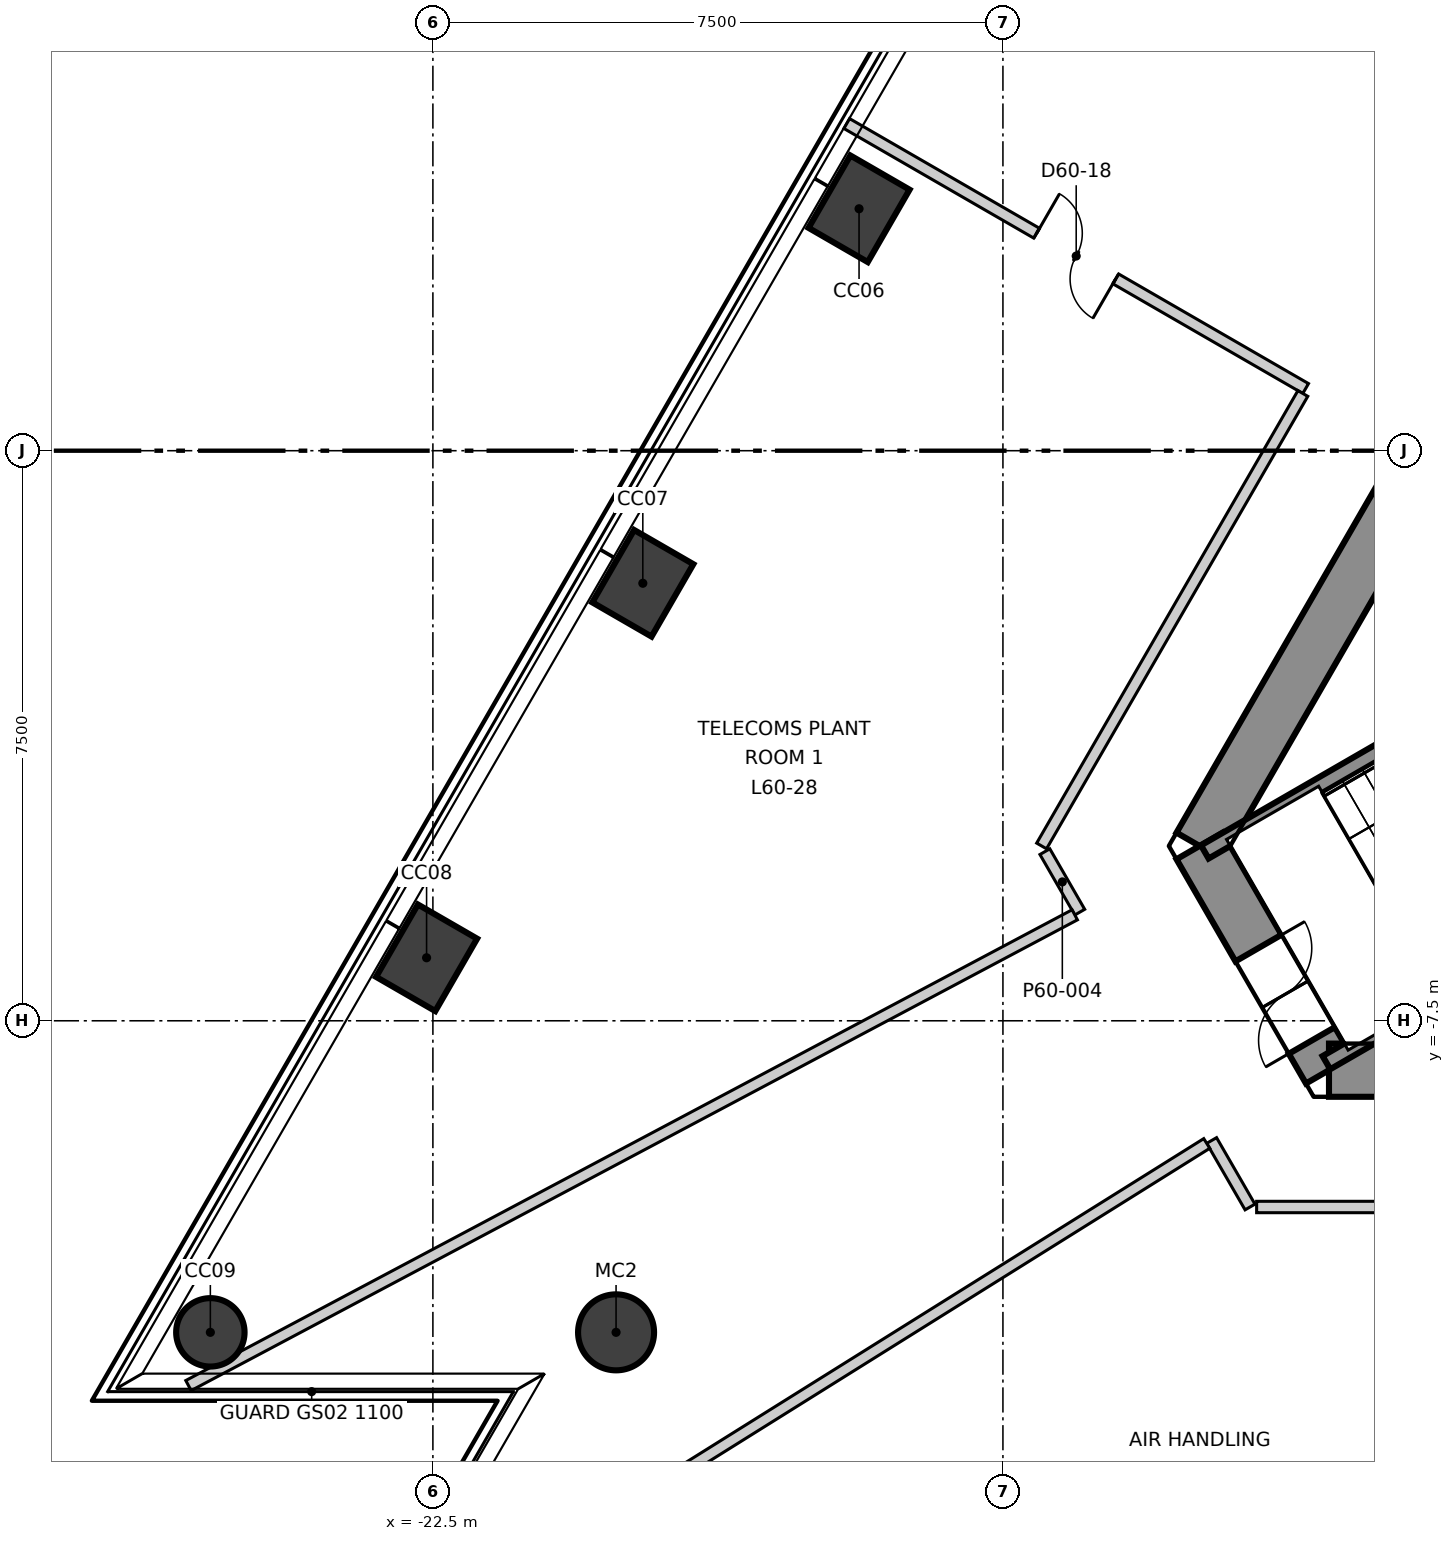
"""IFC4 building model, lengths in metres.
Left out: names, types, materials, properties, quantities, classifications, styles, units other than length and angle.
Written with IfcOpenShell. Run it as: python <this file> out.ifc"""

import sys

from ifc_helpers import new_model, si_unit, direction, frame, frame_2d, origin, origin_2d, place, context, subcontext, project, spatial, polyline, rectangle, circle, outline, extrude, element, fill, save


model = new_model("IFC4")
c1 = context("Model", 3, precision=1e-05, world=origin(), true_north=direction((0.0, 1.0)))
c2 = subcontext(c1, "Body", "Model", "MODEL_VIEW")
j1 = project(units=[si_unit("LENGTHUNIT", "METRE"), si_unit("PLANEANGLEUNIT", "RADIAN")], contexts=[c1])
p1 = place(None, origin())
s1 = spatial("IfcSite", under=j1, at=p1, CompositionType="ELEMENT")
p2 = place(p1, origin())
s2 = spatial("IfcBuilding", under=s1, at=p2, CompositionType="ELEMENT")
p3 = place(p2, frame((0.0, 0.0, 255.8)))
s3 = spatial("IfcBuildingStorey", under=s2, at=p3, CompositionType="ELEMENT", Elevation=255.8)
p4 = place(p3, frame((-1.703, 13.35, -0.6), z_axis=(0.0, 0.0, 1.0), x_axis=(-0.500011533395, -0.866018744874, 0.0)))
e1 = element("IfcWall", 1, at=p4, inside=s3, PredefinedType="SHEAR", context=c2, shape_type="SweptSolid", body=[
    extrude(outline(polyline([(-0.202, -0.35), (1.782, -0.35), (3.766, -0.35), (5.75, -0.35), (7.734, -0.35), (9.718, -0.35), (11.702, -0.35), (13.686, -0.35), (15.67, -0.35), (17.654, -0.35), (19.638, -0.35), (21.622, -0.35), (21.218, 0.35), (19.307, 0.35), (17.397, 0.35), (15.486, 0.35), (13.576, 0.35), (11.665, 0.35), (9.755, 0.35), (7.844, 0.35), (5.934, 0.35), (4.023, 0.35), (2.113, 0.35), (0.202, 0.35), (-0.202, -0.35)])), origin(), (0.0, 0.0, 1.0), 6.3),
])
p5 = place(p4, frame((10.16, 0.0, 0.6)))
e2 = element("IfcOpeningElement", 2, at=p5, cuts=e1, PredefinedType="OPENING", context=c2, shape_type="SweptSolid", body=[
    extrude(rectangle(XDim=1.1, YDim=2.1, at=frame_2d((0.55, 1.05))), frame((0.0, 0.36, 0.0), z_axis=(0.0, -1.0, 0.0), x_axis=(1.0, 0.0, 0.0)), (0.0, 0.0, 1.0), 0.72),
])
p6 = place(p3, frame((-12.413, -5.2, -0.6), z_axis=(0.0, 0.0, 1.0), x_axis=(0.49999337185, -0.866029230515, 0.0)))
e3 = element("IfcWall", 3, at=p6, inside=s3, PredefinedType="SHEAR", context=c2, shape_type="SweptSolid", body=[
    extrude(outline(polyline([(-0.202, -0.35), (1.703, -0.35), (3.608, -0.35), (3.204, 0.35), (1.703, 0.35), (0.202, 0.35), (-0.202, -0.35)])), origin(), (0.0, 0.0, 1.0), 6.3),
])
p7 = place(p6, frame((1.553, 0.0, 0.6)))
e4 = element("IfcOpeningElement", 4, at=p7, cuts=e3, PredefinedType="OPENING", context=c2, shape_type="SweptSolid", body=[
    extrude(rectangle(XDim=1.4, YDim=2.1, at=frame_2d((0.7, 1.05))), frame((0.0, 0.36, 0.0), z_axis=(0.0, -1.0, 0.0), x_axis=(1.0, 0.0, 0.0)), (0.0, 0.0, 1.0), 0.72),
])
p8 = place(p3, frame((-10.71, -8.15, -0.6), z_axis=(0.0, 0.0, 1.0), x_axis=(1.0, 0.0, 0.0)))
e5 = element("IfcWall", 5, at=p8, inside=s3, PredefinedType="SHEAR", context=c2, shape_type="SweptSolid", body=[
    extrude(outline(polyline([(-0.202, -0.35), (1.782, -0.35), (3.766, -0.35), (5.75, -0.35), (7.734, -0.35), (9.718, -0.35), (11.702, -0.35), (13.686, -0.35), (15.67, -0.35), (17.654, -0.35), (19.638, -0.35), (21.622, -0.35), (21.218, 0.35), (19.307, 0.35), (17.397, 0.35), (15.486, 0.35), (13.576, 0.35), (11.665, 0.35), (9.755, 0.35), (7.844, 0.35), (5.934, 0.35), (4.023, 0.35), (2.113, 0.35), (0.202, 0.35), (-0.202, -0.35)])), origin(), (0.0, 0.0, 1.0), 6.3),
])
p9 = place(p8, frame((9.81, 0.0, 0.6)))
e6 = element("IfcOpeningElement", 6, at=p9, cuts=e5, PredefinedType="OPENING", context=c2, shape_type="SweptSolid", body=[
    extrude(rectangle(XDim=1.8, YDim=2.1, at=frame_2d((0.9, 1.05))), frame((0.0, 0.36, 0.0), z_axis=(0.0, -1.0, 0.0), x_axis=(1.0, 0.0, 0.0)), (0.0, 0.0, 1.0), 0.72),
])
for number, where, z_axis, x_axis in (
    (7, (-16.893, 3.183, -0.6), (0.0, 0.0, 1.0), (0.5, 0.866, 0.0)),
    (8, (-19.738, -1.744, -0.6), (0.0, 0.0, 1.0), (0.5, 0.866, 0.0)),
    (9, (-22.583, -6.671, -0.6), (0.0, 0.0, 1.0), (0.5, 0.866, 0.0)),
):
    element("IfcColumn", number, at=place(p3, frame(where, z_axis=z_axis, x_axis=x_axis)), inside=s3, PredefinedType="COLUMN", context=c2, shape_type="SweptSolid", body=[
        extrude(rectangle(XDim=1.1, YDim=0.9, at=origin_2d()), origin(), (0.0, 0.0, 1.0), 6.3),
    ])
p10 = place(p3, frame((-25.428, -11.599, -0.6), z_axis=(0.0, 0.0, 1.0), x_axis=(0.5, 0.866025403784, 0.0)))
e10 = element("IfcColumn", 10, at=p10, inside=s3, PredefinedType="COLUMN", context=c2, shape_type="SweptSolid", body=[
    extrude(circle(Radius=0.45, at=origin_2d()), origin(), (0.0, 0.0, 1.0), 6.3),
])
p11 = place(p3, frame((-20.09, -11.599, -0.6), z_axis=(0.0, 0.0, 1.0), x_axis=(1.0, 0.0, 0.0)))
e11 = element("IfcColumn", 11, at=p11, inside=s3, PredefinedType="COLUMN", context=c2, shape_type="SweptSolid", body=[
    extrude(circle(Radius=0.5, at=origin_2d()), origin(), (0.0, 0.0, 1.0), 6.3),
])
p12 = place(p3, frame((-17.055, 4.304, 0.0), z_axis=(0.0, 0.0, 1.0), x_axis=(0.866032219707, -0.49998819429, 0.0)))
e12 = element("IfcWall", 12, at=p12, inside=s3, PredefinedType="PARTITIONING", context=c2, shape_type="SweptSolid", body=[
    extrude(rectangle(XDim=6.972, YDim=0.15, at=frame_2d((3.486, 0.0))), origin(), (0.0, 0.0, 1.0), 5.7),
])
p13 = place(p12, frame((2.886, 0.0, 0.0)))
e13 = element("IfcOpeningElement", 13, at=p13, cuts=e12, PredefinedType="OPENING", context=c2, shape_type="SweptSolid", body=[
    extrude(rectangle(XDim=1.2, YDim=2.1, at=frame_2d((0.6, 1.05))), frame((0.0, 0.085, 0.0), z_axis=(0.0, -1.0, 0.0), x_axis=(1.0, 0.0, 0.0)), (0.0, 0.0, 1.0), 0.17),
])
p14 = place(p3, frame((-14.491, -5.2, 0.0), z_axis=(0.0, 0.0, 1.0), x_axis=(0.50001247681, 0.866018200175, 0.0)))
e14 = element("IfcWall", 14, at=p14, inside=s3, PredefinedType="PARTITIONING", context=c2, shape_type="SweptSolid", body=[
    extrude(rectangle(XDim=6.874, YDim=0.15, at=frame_2d((3.437, 0.0))), origin(), (0.0, 0.0, 1.0), 5.7),
])
p15 = place(p3, frame((-14.448, -5.275, 0.0), z_axis=(0.0, 0.0, 1.0), x_axis=(0.499454108712, -0.866340344952, 0.0)))
e15 = element("IfcWall", 15, at=p15, inside=s3, PredefinedType="PARTITIONING", context=c2, shape_type="SweptSolid", body=[
    extrude(rectangle(XDim=0.919, YDim=0.15, at=frame_2d((0.459, 0.0))), origin(), (0.0, 0.0, 1.0), 5.7),
])
p16 = place(p3, frame((-12.254, -9.075, 0.0), z_axis=(0.0, 0.0, 1.0), x_axis=(0.499778243608, -0.866153397047, 0.0)))
e16 = element("IfcWall", 16, at=p16, inside=s3, PredefinedType="PARTITIONING", context=c2, shape_type="SweptSolid", body=[
    extrude(rectangle(XDim=1.01, YDim=0.15, at=frame_2d((0.505, 0.0))), origin(), (0.0, 0.0, 1.0), 5.7),
])
p17 = place(p3, frame((-25.716, -12.299, 0.0), z_axis=(0.0, 0.0, 1.0), x_axis=(0.883174126978, 0.469045265871, 0.0)))
e17 = element("IfcWall", 17, at=p17, inside=s3, PredefinedType="PARTITIONING", context=c2, shape_type="SweptSolid", body=[
    extrude(rectangle(XDim=13.204, YDim=0.15, at=frame_2d((6.602, 0.0))), origin(), (0.0, 0.0, 1.0), 5.1),
])
p18 = place(p3, frame((-23.499, -16.104, 0.0), z_axis=(0.0, 0.0, 1.0), x_axis=(0.847932766804, 0.530103785103, 0.0)))
e18 = element("IfcWall", 18, at=p18, inside=s3, PredefinedType="PARTITIONING", context=c2, shape_type="SweptSolid", body=[
    extrude(rectangle(XDim=13.186, YDim=0.15, at=frame_2d((6.593, 0.0))), origin(), (0.0, 0.0, 1.0), 5.1),
])
p19 = place(p3, frame((-11.662, -9.95, 0.0), z_axis=(0.0, 0.0, 1.0), x_axis=(1.0, 0.0, 0.0)))
e19 = element("IfcWall", 19, at=p19, inside=s3, PredefinedType="PARTITIONING", context=c2, shape_type="SweptSolid", body=[
    extrude(rectangle(XDim=6.862, YDim=0.15, at=frame_2d((3.431, 0.0))), origin(), (0.0, 0.0, 1.0), 5.7),
])
p20 = place(p19, frame((2.787, 0.0, 0.0)))
e20 = element("IfcOpeningElement", 20, at=p20, cuts=e19, PredefinedType="OPENING", context=c2, shape_type="SweptSolid", body=[
    extrude(rectangle(XDim=1.2, YDim=2.1, at=frame_2d((0.6, 1.05))), frame((0.0, 0.085, 0.0), z_axis=(0.0, -1.0, 0.0), x_axis=(1.0, 0.0, 0.0)), (0.0, 0.0, 1.0), 0.17),
])
p21 = place(p3, frame((-12.344, -5.279, 0.0), z_axis=(0.0, 0.0, 1.0), x_axis=(0.866046323291, 0.499963764601, 0.0)))
e21 = element("IfcWall", 21, at=p21, inside=s3, PredefinedType="SOLIDWALL", context=c2, shape_type="SweptSolid", body=[
    extrude(rectangle(XDim=6.714, YDim=0.2, at=frame_2d((3.357, 0.0))), origin(), (0.0, 0.0, 1.0), 5.7),
])
p22 = place(p3, frame((-10.744, -8.051, 0.0), z_axis=(0.0, 0.0, 1.0), x_axis=(0.865983344943, 0.500072840975, 0.0)))
e22 = element("IfcWall", 22, at=p22, inside=s3, PredefinedType="SOLIDWALL", context=c2, shape_type="SweptSolid", body=[
    extrude(rectangle(XDim=6.715, YDim=0.2, at=frame_2d((3.357, 0.0))), origin(), (0.0, 0.0, 1.0), 5.7),
])
p23 = place(p13, origin())
e23 = element("IfcDoor", 23, at=p23, inside=s3, OperationType="DOUBLE_DOOR_SINGLE_SWING", PredefinedType="DOOR", context=c2, shape_type="SweptSolid", body=[
    extrude(rectangle(XDim=1.2, YDim=2.1, at=frame_2d((0.6, 1.05))), frame((0.0, 0.025, 0.0), z_axis=(0.0, -1.0, 0.0), x_axis=(1.0, 0.0, 0.0)), (0.0, 0.0, 1.0), 0.05),
])
fill(e13, e23)
p24 = place(p7, origin())
e24 = element("IfcDoor", 24, at=p24, inside=s3, OperationType="DOUBLE_DOOR_SINGLE_SWING", PredefinedType="DOOR", context=c2, shape_type="SweptSolid", body=[
    extrude(rectangle(XDim=1.4, YDim=2.1, at=frame_2d((0.7, 1.05))), frame((0.0, 0.025, 0.0), z_axis=(0.0, -1.0, 0.0), x_axis=(1.0, 0.0, 0.0)), (0.0, 0.0, 1.0), 0.05),
])
fill(e4, e24)
save(model, sys.argv[1])
